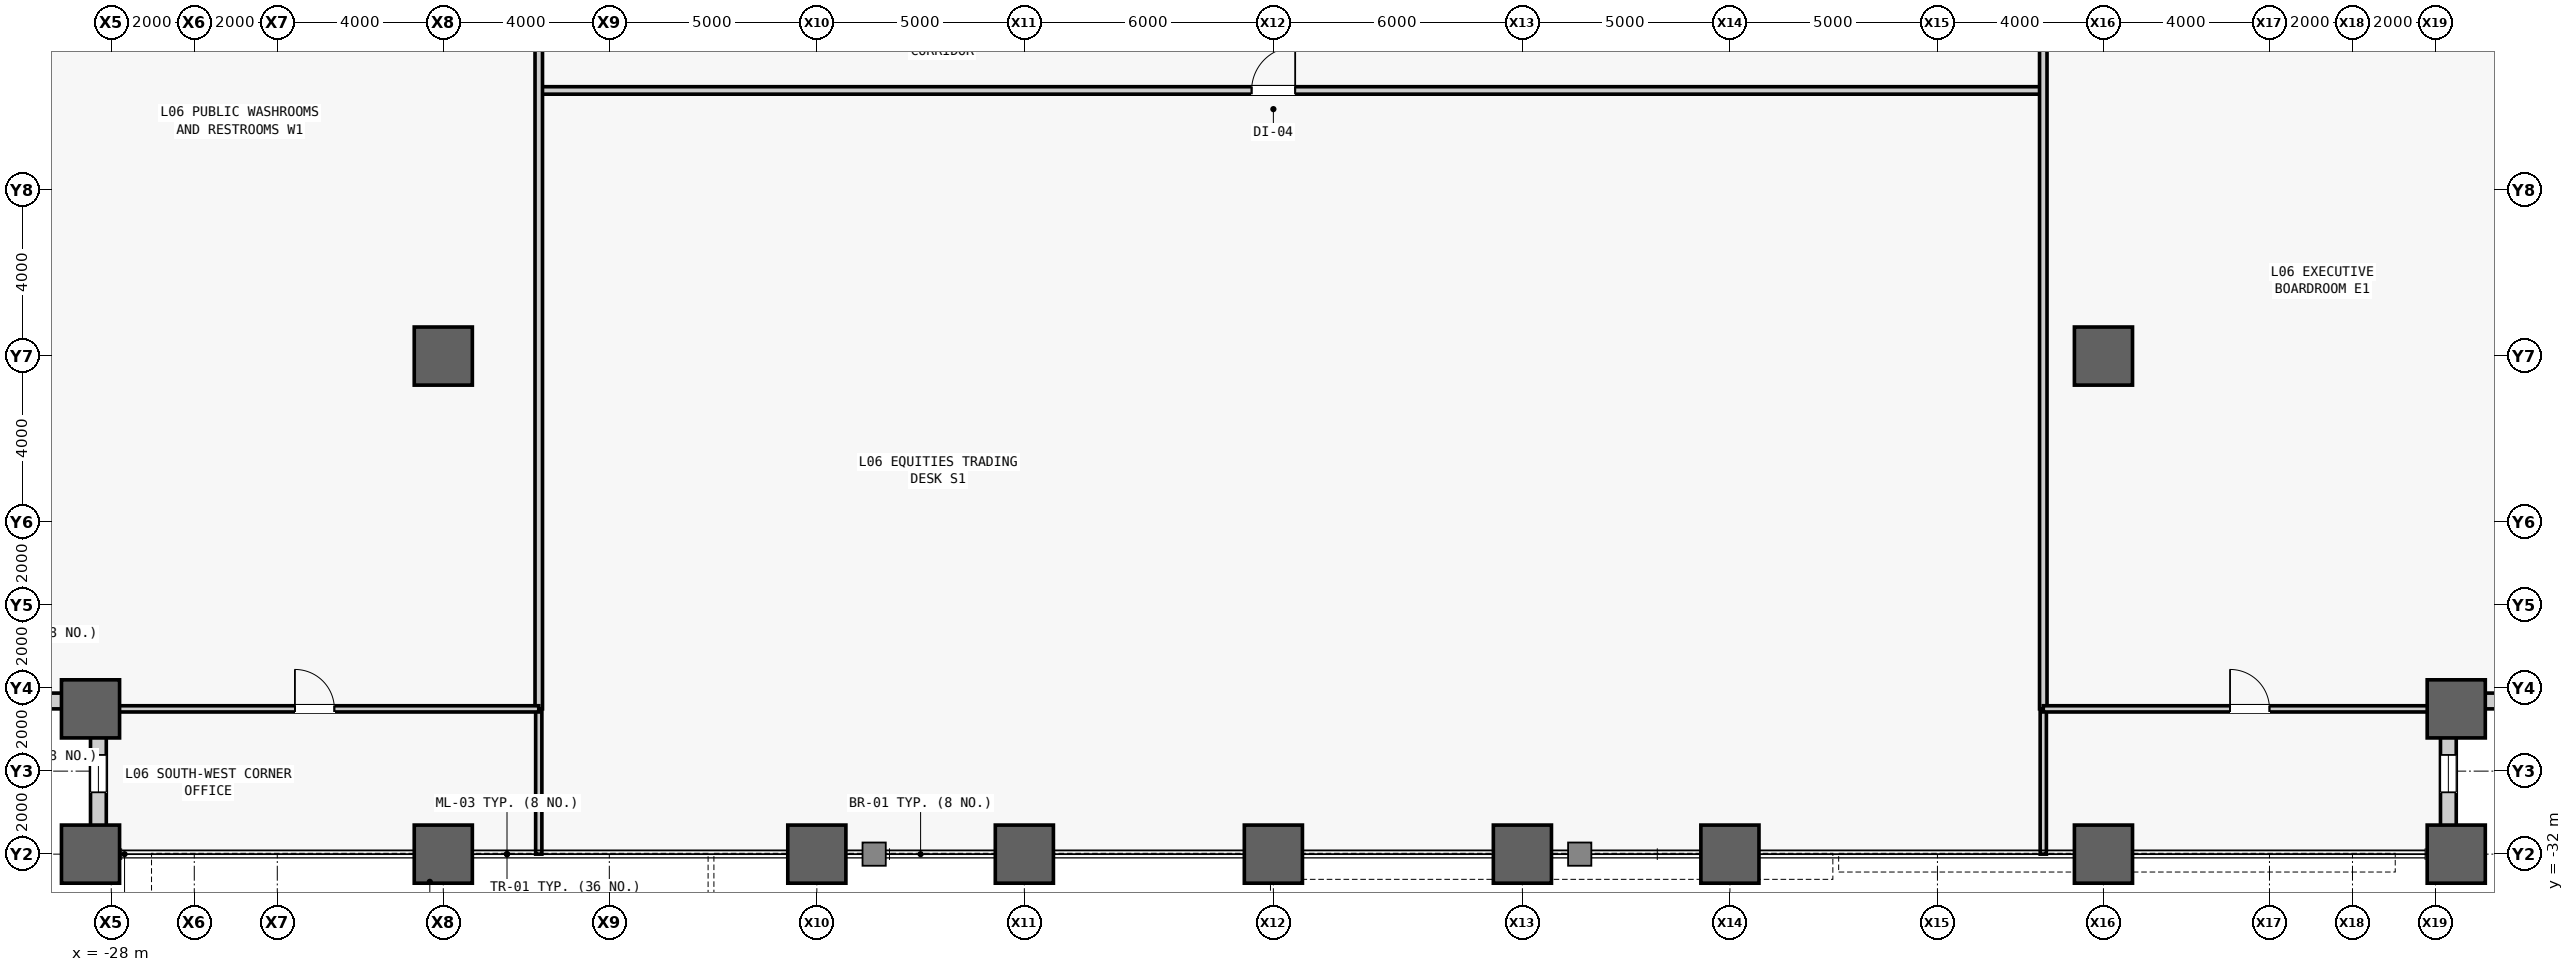
"""IFC4 building model, lengths in metres.
Left out: names, types, materials, properties, quantities, classifications, styles, units other than length and angle.
Written with IfcOpenShell. Run it as: python <this file> out.ifc"""

import sys

from ifc_helpers import new_model, si_unit, direction, frame, frame_2d, origin, origin_2d, place, context, subcontext, project, spatial, rectangle, hollow_rectangle, extrude, source, transform, mapped, element, fill, save


model = new_model("IFC4")
c1 = context("Model", 3, precision=1e-05, world=origin(), true_north=direction((0.0, 1.0)))
c2 = subcontext(c1, "Body", "Model", "MODEL_VIEW")
j1 = project(units=[si_unit("LENGTHUNIT", "METRE"), si_unit("PLANEANGLEUNIT", "RADIAN")], contexts=[c1])
p1 = place(None, origin())
s1 = spatial("IfcSite", under=j1, at=p1, CompositionType="ELEMENT")
p2 = place(p1, origin())
s2 = spatial("IfcBuilding", under=s1, at=p2, CompositionType="ELEMENT")
p3 = place(p2, frame((0.0, 0.0, 32.6)))
s3 = spatial("IfcBuildingStorey", under=s2, at=p3, CompositionType="ELEMENT", Elevation=32.6)
m1 = source(origin(), c2, "Body", "SweptSolid", [
    extrude(hollow_rectangle(XDim=1.4, YDim=1.4, WallThickness=0.075, at=origin_2d()), origin(), (0.0, 0.0, 1.0), 4.2),
])
for number, where, z_axis, x_axis in (
    (1, (-28.5, -32.0, 0.0), (0.0, 0.0, 1.0), (1.0, 0.0, 0.0)),
    (2, (-28.5, -28.5, 0.0), (0.0, 0.0, 1.0), (1.0, 0.0, 0.0)),
    (3, (-20.0, -32.0, 0.0), (0.0, 0.0, 1.0), (1.0, 0.0, 0.0)),
    (4, (-20.0, -20.0, 0.0), (0.0, 0.0, 1.0), (1.0, 0.0, 0.0)),
    (5, (-11.0, -32.0, 0.0), (0.0, 0.0, 1.0), (1.0, 0.0, 0.0)),
    (6, (-6.0, -32.0, 0.0), (0.0, 0.0, 1.0), (1.0, 0.0, 0.0)),
    (7, (0.0, -32.0, 0.0), (0.0, 0.0, 1.0), (1.0, 0.0, 0.0)),
    (8, (6.0, -32.0, 0.0), (0.0, 0.0, 1.0), (1.0, 0.0, 0.0)),
    (9, (11.0, -32.0, 0.0), (0.0, 0.0, 1.0), (1.0, 0.0, 0.0)),
    (10, (20.0, -32.0, 0.0), (0.0, 0.0, 1.0), (1.0, 0.0, 0.0)),
    (11, (20.0, -20.0, 0.0), (0.0, 0.0, 1.0), (1.0, 0.0, 0.0)),
    (12, (28.5, -32.0, 0.0), (0.0, 0.0, 1.0), (1.0, 0.0, 0.0)),
    (13, (28.5, -28.5, 0.0), (0.0, 0.0, 1.0), (1.0, 0.0, 0.0)),
):
    element("IfcColumn", number, at=place(p3, frame(where, z_axis=z_axis, x_axis=x_axis)), inside=s3, PredefinedType="COLUMN", context=c2, shape_type="MappedRepresentation", body=[
        mapped(m1, transform((0.0, 0.0, 0.0), scale=1.0)),
    ])
m2 = source(origin(), c2, "Body", "SweptSolid", [
    extrude(rectangle(XDim=3.12, YDim=0.38, at=frame_2d((1.56, 0.0))), origin(), (0.0, 0.0, 1.0), 3.245),
])
p4 = place(p3, frame((-28.5, -28.31, 0.0), z_axis=(0.0, 0.0, 1.0), x_axis=(-1.0, 0.0, 0.0)))
e14 = element("IfcWall", 14, at=p4, inside=s3, PredefinedType="STANDARD", context=c2, shape_type="MappedRepresentation", body=[
    mapped(m2, transform((0.0, 0.0, 0.0), scale=1.0)),
])
m3 = source(origin(), c2, "Body", "SweptSolid", [
    extrude(rectangle(XDim=0.9, YDim=2.4, at=frame_2d((0.45, 1.2))), frame((0.0, 0.2, 0.0), z_axis=(0.0, -1.0, 0.0), x_axis=(1.0, 0.0, 0.0)), (0.0, 0.0, 1.0), 0.4),
])
p5 = place(p4, frame((1.11, 0.0, 0.5)))
e15 = element("IfcOpeningElement", 15, at=p5, cuts=e14, PredefinedType="OPENING", context=c2, shape_type="MappedRepresentation", body=[
    mapped(m3, transform((0.0, 0.0, 0.0), scale=1.0)),
])
p6 = place(p3, frame((-28.31, -31.62, 0.0), z_axis=(0.0, 0.0, 1.0), x_axis=(0.0, 1.0, 0.0)))
e16 = element("IfcWall", 16, at=p6, inside=s3, PredefinedType="STANDARD", context=c2, shape_type="MappedRepresentation", body=[
    mapped(m2, transform((0.0, 0.0, 0.0), scale=1.0)),
])
p7 = place(p6, frame((1.11, 0.0, 0.5)))
e17 = element("IfcOpeningElement", 17, at=p7, cuts=e16, PredefinedType="OPENING", context=c2, shape_type="MappedRepresentation", body=[
    mapped(m3, transform((0.0, 0.0, 0.0), scale=1.0)),
])
p8 = place(p3, frame((28.31, -31.62, 0.0), z_axis=(0.0, 0.0, 1.0), x_axis=(0.0, 1.0, 0.0)))
e18 = element("IfcWall", 18, at=p8, inside=s3, PredefinedType="STANDARD", context=c2, shape_type="MappedRepresentation", body=[
    mapped(m2, transform((0.0, 0.0, 0.0), scale=1.0)),
])
p9 = place(p8, frame((1.11, 0.0, 0.5)))
e19 = element("IfcOpeningElement", 19, at=p9, cuts=e18, PredefinedType="OPENING", context=c2, shape_type="MappedRepresentation", body=[
    mapped(m3, transform((0.0, 0.0, 0.0), scale=1.0)),
])
p10 = place(p3, frame((28.5, -28.31, 0.0), z_axis=(0.0, 0.0, 1.0), x_axis=(1.0, 0.0, 0.0)))
e20 = element("IfcWall", 20, at=p10, inside=s3, PredefinedType="STANDARD", context=c2, shape_type="MappedRepresentation", body=[
    mapped(m2, transform((0.0, 0.0, 0.0), scale=1.0)),
])
p11 = place(p10, frame((1.11, 0.0, 0.5)))
e21 = element("IfcOpeningElement", 21, at=p11, cuts=e20, PredefinedType="OPENING", context=c2, shape_type="MappedRepresentation", body=[
    mapped(m3, transform((0.0, 0.0, 0.0), scale=1.0)),
])
m4 = source(origin(), c2, "Body", "SweptSolid", [
    extrude(rectangle(XDim=36.25, YDim=0.18, at=frame_2d((18.125, 0.0))), origin(), (0.0, 0.0, 1.0), 3.94),
])
p12 = place(p3, frame((-17.7, -13.6, 0.0), z_axis=(0.0, 0.0, 1.0), x_axis=(1.0, 0.0, 0.0)))
e22 = element("IfcWall", 22, at=p12, inside=s3, PredefinedType="PARTITIONING", context=c2, shape_type="MappedRepresentation", body=[
    mapped(m4, transform((0.0, 0.0, 0.0), scale=1.0)),
])
m5 = source(origin(), c2, "Body", "SweptSolid", [
    extrude(rectangle(XDim=1.05, YDim=2.2, at=frame_2d((0.525, 1.1))), frame((0.0, 0.1, 0.0), z_axis=(0.0, -1.0, 0.0), x_axis=(1.0, 0.0, 0.0)), (0.0, 0.0, 1.0), 0.2),
])
p13 = place(p12, frame((17.175, 0.0, 0.0)))
e23 = element("IfcOpeningElement", 23, at=p13, cuts=e22, PredefinedType="OPENING", context=c2, shape_type="MappedRepresentation", body=[
    mapped(m5, transform((0.0, 0.0, 0.0), scale=1.0)),
])
m6 = source(origin(), c2, "Body", "SweptSolid", [
    extrude(rectangle(XDim=3.5, YDim=0.15, at=frame_2d((1.75, 0.0))), origin(), (0.0, 0.0, 1.0), 3.94),
])
for number, where, z_axis, x_axis in (
    (24, (-17.7, -32.0, 0.0), (0.0, 0.0, 1.0), (0.0, 1.0, 0.0)),
    (25, (18.55, -32.0, 0.0), (0.0, 0.0, 1.0), (0.0, 1.0, 0.0)),
):
    element("IfcWall", number, at=place(p3, frame(where, z_axis=z_axis, x_axis=x_axis)), inside=s3, PredefinedType="PARTITIONING", context=c2, shape_type="MappedRepresentation", body=[
        mapped(m6, transform((0.0, 0.0, 0.0), scale=1.0)),
    ])
m7 = source(origin(), c2, "Body", "SweptSolid", [
    extrude(rectangle(XDim=57.0, YDim=0.18, at=frame_2d((28.5, 0.0))), origin(), (0.0, 0.0, 1.0), 3.94),
])
p14 = place(p3, frame((-17.7, -28.5, 0.0), z_axis=(0.0, 0.0, 1.0), x_axis=(0.0, 1.0, 0.0)))
e26 = element("IfcWall", 26, at=p14, inside=s3, PredefinedType="PARTITIONING", context=c2, shape_type="MappedRepresentation", body=[
    mapped(m7, transform((0.0, 0.0, 0.0), scale=1.0)),
])
m8 = source(origin(), c2, "Body", "SweptSolid", [
    extrude(rectangle(XDim=0.95, YDim=2.15, at=frame_2d((0.475, 1.075))), frame((0.0, 0.1, 0.0), z_axis=(0.0, -1.0, 0.0), x_axis=(1.0, 0.0, 0.0)), (0.0, 0.0, 1.0), 0.2),
])
p15 = place(p14, frame((28.025, 0.0, 0.0)))
e27 = element("IfcOpeningElement", 27, at=p15, cuts=e26, PredefinedType="OPENING", context=c2, shape_type="MappedRepresentation", body=[
    mapped(m8, transform((0.0, 0.0, 0.0), scale=1.0)),
])
p16 = place(p3, frame((18.55, -28.5, 0.0), z_axis=(0.0, 0.0, 1.0), x_axis=(0.0, 1.0, 0.0)))
e28 = element("IfcWall", 28, at=p16, inside=s3, PredefinedType="PARTITIONING", context=c2, shape_type="MappedRepresentation", body=[
    mapped(m7, transform((0.0, 0.0, 0.0), scale=1.0)),
])
p17 = place(p16, frame((19.485, 0.0, 0.0)))
e29 = element("IfcOpeningElement", 29, at=p17, cuts=e28, PredefinedType="OPENING", context=c2, shape_type="MappedRepresentation", body=[
    mapped(m8, transform((0.0, 0.0, 0.0), scale=1.0)),
])
p18 = place(p16, frame((28.705, 0.0, 0.0)))
e30 = element("IfcOpeningElement", 30, at=p18, cuts=e28, PredefinedType="OPENING", context=c2, shape_type="MappedRepresentation", body=[
    mapped(m8, transform((0.0, 0.0, 0.0), scale=1.0)),
])
p19 = place(p16, frame((37.245, 0.0, 0.0)))
e31 = element("IfcOpeningElement", 31, at=p19, cuts=e28, PredefinedType="OPENING", context=c2, shape_type="MappedRepresentation", body=[
    mapped(m8, transform((0.0, 0.0, 0.0), scale=1.0)),
])
m9 = source(origin(), c2, "Body", "SweptSolid", [
    extrude(rectangle(XDim=10.8, YDim=0.15, at=frame_2d((5.4, 0.0))), origin(), (0.0, 0.0, 1.0), 3.94),
])
p20 = place(p3, frame((-28.5, -28.5, 0.0), z_axis=(0.0, 0.0, 1.0), x_axis=(1.0, 0.0, 0.0)))
e32 = element("IfcWall", 32, at=p20, inside=s3, PredefinedType="PARTITIONING", context=c2, shape_type="MappedRepresentation", body=[
    mapped(m9, transform((0.0, 0.0, 0.0), scale=1.0)),
])
m10 = source(origin(), c2, "Body", "SweptSolid", [
    extrude(rectangle(XDim=0.95, YDim=2.15, at=frame_2d((0.475, 1.075))), frame((0.0, 0.085, 0.0), z_axis=(0.0, -1.0, 0.0), x_axis=(1.0, 0.0, 0.0)), (0.0, 0.0, 1.0), 0.17),
])
p21 = place(p20, frame((4.925, 0.0, 0.0)))
e33 = element("IfcOpeningElement", 33, at=p21, cuts=e32, PredefinedType="OPENING", context=c2, shape_type="MappedRepresentation", body=[
    mapped(m10, transform((0.0, 0.0, 0.0), scale=1.0)),
])
m11 = source(origin(), c2, "Body", "SweptSolid", [
    extrude(rectangle(XDim=9.95, YDim=0.15, at=frame_2d((4.975, 0.0))), origin(), (0.0, 0.0, 1.0), 3.94),
])
p22 = place(p3, frame((18.55, -28.5, 0.0), z_axis=(0.0, 0.0, 1.0), x_axis=(1.0, 0.0, 0.0)))
e34 = element("IfcWall", 34, at=p22, inside=s3, PredefinedType="PARTITIONING", context=c2, shape_type="MappedRepresentation", body=[
    mapped(m11, transform((0.0, 0.0, 0.0), scale=1.0)),
])
p23 = place(p22, frame((4.5, 0.0, 0.0)))
e35 = element("IfcOpeningElement", 35, at=p23, cuts=e34, PredefinedType="OPENING", context=c2, shape_type="MappedRepresentation", body=[
    mapped(m10, transform((0.0, 0.0, 0.0), scale=1.0)),
])
m12 = source(origin(), c2, "Body", "SweptSolid", [
    extrude(rectangle(XDim=0.9, YDim=2.4, at=frame_2d((0.45, 1.2))), frame((0.0, 0.03, 0.0), z_axis=(0.0, -1.0, 0.0), x_axis=(1.0, 0.0, 0.0)), (0.0, 0.0, 1.0), 0.06),
])
p24 = place(p7, origin())
e36 = element("IfcWindow", 36, at=p24, inside=s3, PartitioningType="SINGLE_PANEL", PredefinedType="WINDOW", context=c2, shape_type="MappedRepresentation", body=[
    mapped(m12, transform((0.0, 0.0, 0.0), scale=1.0)),
])
fill(e17, e36)
p25 = place(p9, origin())
e37 = element("IfcWindow", 37, at=p25, inside=s3, PartitioningType="SINGLE_PANEL", PredefinedType="WINDOW", context=c2, shape_type="MappedRepresentation", body=[
    mapped(m12, transform((0.0, 0.0, 0.0), scale=1.0)),
])
fill(e19, e37)
m13 = source(origin(), c2, "Body", "SweptSolid", [
    extrude(rectangle(XDim=1.05, YDim=2.2, at=frame_2d((0.525, 1.1))), frame((0.0, 0.025, 0.0), z_axis=(0.0, -1.0, 0.0), x_axis=(1.0, 0.0, 0.0)), (0.0, 0.0, 1.0), 0.05),
])
p26 = place(p13, origin())
e38 = element("IfcDoor", 38, at=p26, inside=s3, OperationType="SINGLE_SWING_RIGHT", PredefinedType="DOOR", context=c2, shape_type="MappedRepresentation", body=[
    mapped(m13, transform((0.0, 0.0, 0.0), scale=1.0)),
])
fill(e23, e38)
m14 = source(origin(), c2, "Body", "SweptSolid", [
    extrude(rectangle(XDim=0.95, YDim=2.15, at=frame_2d((0.475, 1.075))), frame((0.0, 0.025, 0.0), z_axis=(0.0, -1.0, 0.0), x_axis=(1.0, 0.0, 0.0)), (0.0, 0.0, 1.0), 0.05),
])
p27 = place(p21, origin())
e39 = element("IfcDoor", 39, at=p27, inside=s3, OperationType="SINGLE_SWING_LEFT", PredefinedType="DOOR", context=c2, shape_type="MappedRepresentation", body=[
    mapped(m14, transform((0.0, 0.0, 0.0), scale=1.0)),
])
fill(e33, e39)
p28 = place(p23, origin())
e40 = element("IfcDoor", 40, at=p28, inside=s3, OperationType="SINGLE_SWING_LEFT", PredefinedType="DOOR", context=c2, shape_type="MappedRepresentation", body=[
    mapped(m14, transform((0.0, 0.0, 0.0), scale=1.0)),
])
fill(e35, e40)
save(model, sys.argv[1])
